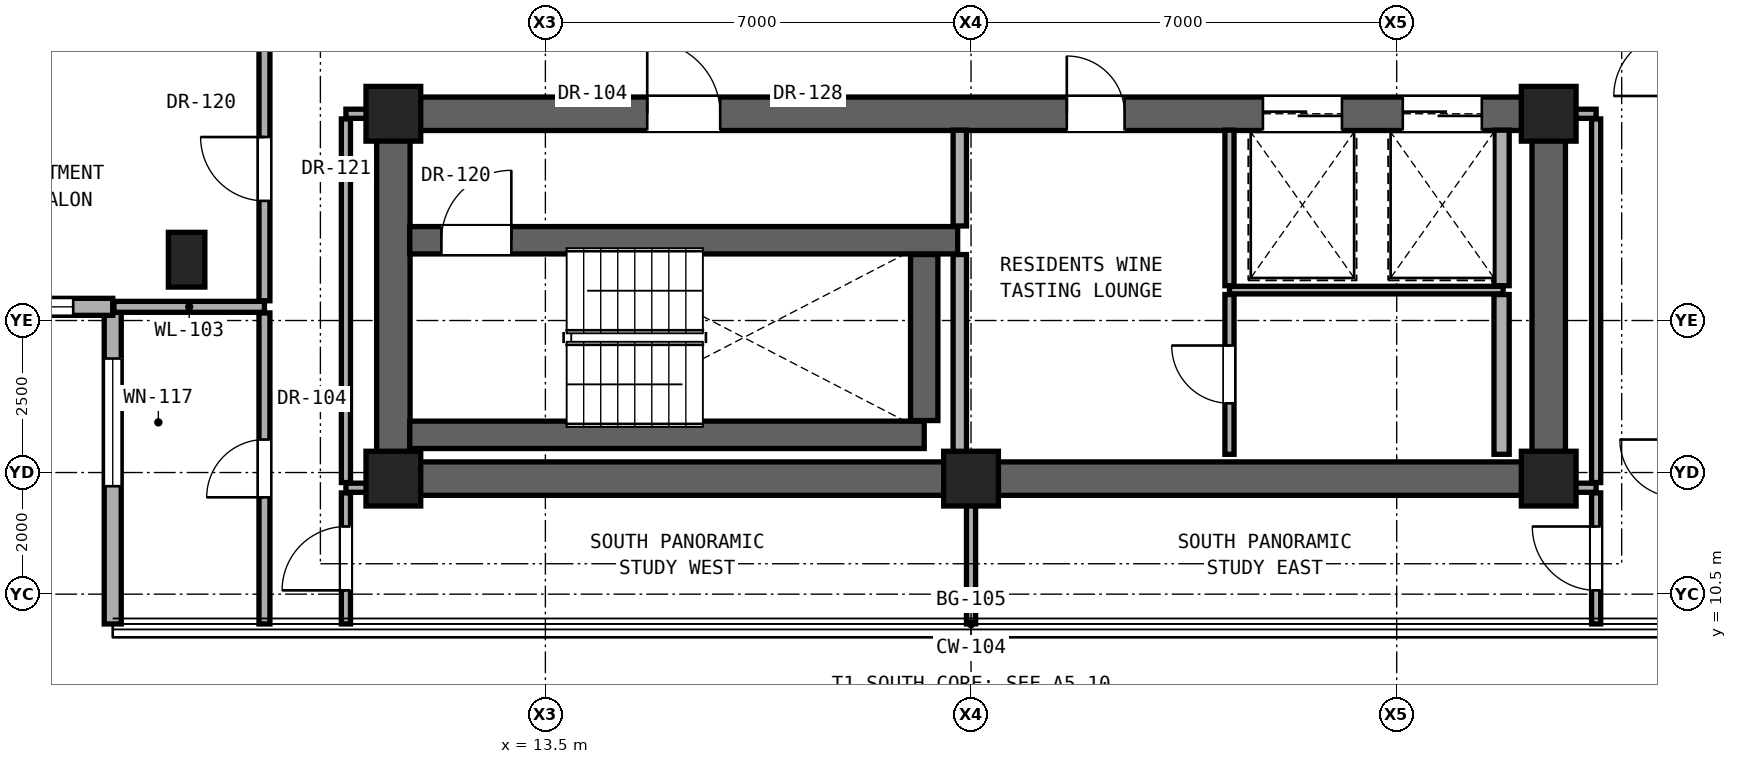
"""IFC4 building model, lengths in metres.
Left out: names, types, materials, properties, quantities, classifications, styles, units other than length and angle.
Written with IfcOpenShell. Run it as: python <this file> out.ifc"""

import sys

from ifc_helpers import new_model, si_unit, direction, frame, frame_2d, origin, origin_2d, place, context, subcontext, project, spatial, rectangle, extrude, element, fill, save


model = new_model("IFC4")
c1 = context("Model", 3, precision=1e-05, world=origin(), true_north=direction((0.0, 1.0)))
c2 = subcontext(c1, "Body", "Model", "MODEL_VIEW")
j1 = project(units=[si_unit("LENGTHUNIT", "METRE"), si_unit("PLANEANGLEUNIT", "RADIAN")], contexts=[c1])
p1 = place(None, origin())
s1 = spatial("IfcSite", under=j1, at=p1, CompositionType="ELEMENT")
p2 = place(p1, origin())
s2 = spatial("IfcBuilding", under=s1, at=p2, CompositionType="ELEMENT")
p3 = place(p2, frame((0.0, 0.0, 183.65)))
s3 = spatial("IfcBuildingStorey", under=s2, at=p3, CompositionType="ELEMENT", Elevation=183.65)
for number, where, z_axis, x_axis in (
    (1, (11.0, 12.4, 0.0), (0.0, 0.0, 1.0), (1.0, 0.0, 0.0)),
    (2, (20.5, 12.4, 0.0), (0.0, 0.0, 1.0), (1.0, 0.0, 0.0)),
    (3, (30.0, 12.4, 0.0), (0.0, 0.0, 1.0), (1.0, 0.0, 0.0)),
    (4, (11.0, 18.4, 0.0), (0.0, 0.0, 1.0), (1.0, 0.0, 0.0)),
    (5, (30.0, 18.4, 0.0), (0.0, 0.0, 1.0), (1.0, 0.0, 0.0)),
):
    element("IfcColumn", number, at=place(p3, frame(where, z_axis=z_axis, x_axis=x_axis)), inside=s3, PredefinedType="COLUMN", context=c2, shape_type="SweptSolid", body=[
        extrude(rectangle(XDim=0.9, YDim=0.9, at=origin_2d()), origin(), (0.0, 0.0, 1.0), 3.25),
    ])
p4 = place(p3, frame((7.6, 16.0, 0.0), z_axis=(0.0, 0.0, 1.0), x_axis=(1.0, 0.0, 0.0)))
e6 = element("IfcColumn", 6, at=p4, inside=s3, PredefinedType="PILASTER", context=c2, shape_type="SweptSolid", body=[
    extrude(rectangle(XDim=0.6, YDim=0.9, at=origin_2d()), origin(), (0.0, 0.0, 1.0), 3.25),
])
p5 = place(p3, frame((11.0, 12.4, 0.0), z_axis=(0.0, 0.0, 1.0), x_axis=(1.0, 0.0, 0.0)))
e7 = element("IfcWall", 7, at=p5, inside=s3, PredefinedType="SHEAR", context=c2, shape_type="SweptSolid", body=[
    extrude(rectangle(XDim=19.0, YDim=0.55, at=frame_2d((9.5, 0.0))), origin(), (0.0, 0.0, 1.0), 3.05),
])
for number, where, z_axis, x_axis in (
    (8, (11.0, 12.4, 0.0), (0.0, 0.0, 1.0), (0.0, 1.0, 0.0)),
    (9, (30.0, 12.4, 0.0), (0.0, 0.0, 1.0), (0.0, 1.0, 0.0)),
):
    element("IfcWall", number, at=place(p3, frame(where, z_axis=z_axis, x_axis=x_axis)), inside=s3, PredefinedType="SHEAR", context=c2, shape_type="SweptSolid", body=[
        extrude(rectangle(XDim=6.0, YDim=0.55, at=frame_2d((3.0, 0.0))), origin(), (0.0, 0.0, 1.0), 3.05),
    ])
p6 = place(p3, frame((11.0, 18.4, 0.0), z_axis=(0.0, 0.0, 1.0), x_axis=(1.0, 0.0, 0.0)))
e10 = element("IfcWall", 10, at=p6, inside=s3, PredefinedType="SHEAR", context=c2, shape_type="SweptSolid", body=[
    extrude(rectangle(XDim=19.0, YDim=0.55, at=frame_2d((9.5, 0.0))), origin(), (0.0, 0.0, 1.0), 3.05),
])
p7 = place(p6, frame((4.175, 0.0, 0.0)))
e11 = element("IfcOpeningElement", 11, at=p7, cuts=e10, PredefinedType="OPENING", context=c2, shape_type="SweptSolid", body=[
    extrude(rectangle(XDim=1.2, YDim=2.25, at=frame_2d((0.6, 1.125))), frame((0.0, 0.285, 0.0), z_axis=(0.0, -1.0, 0.0), x_axis=(1.0, 0.0, 0.0)), (0.0, 0.0, 1.0), 0.57),
])
p8 = place(p6, frame((11.075, 0.0, 0.0)))
e12 = element("IfcOpeningElement", 12, at=p8, cuts=e10, PredefinedType="OPENING", context=c2, shape_type="SweptSolid", body=[
    extrude(rectangle(XDim=0.95, YDim=2.15, at=frame_2d((0.475, 1.075))), frame((0.0, 0.285, 0.0), z_axis=(0.0, -1.0, 0.0), x_axis=(1.0, 0.0, 0.0)), (0.0, 0.0, 1.0), 0.57),
])
p9 = place(p6, frame((14.3, 0.0, 0.0)))
e13 = element("IfcOpeningElement", 13, at=p9, cuts=e10, PredefinedType="OPENING", context=c2, shape_type="SweptSolid", body=[
    extrude(rectangle(XDim=1.3, YDim=2.3, at=frame_2d((0.65, 1.15))), frame((0.0, 0.285, 0.0), z_axis=(0.0, -1.0, 0.0), x_axis=(1.0, 0.0, 0.0)), (0.0, 0.0, 1.0), 0.57),
])
p10 = place(p6, frame((16.6, 0.0, 0.0)))
e14 = element("IfcOpeningElement", 14, at=p10, cuts=e10, PredefinedType="OPENING", context=c2, shape_type="SweptSolid", body=[
    extrude(rectangle(XDim=1.3, YDim=2.3, at=frame_2d((0.65, 1.15))), frame((0.0, 0.285, 0.0), z_axis=(0.0, -1.0, 0.0), x_axis=(1.0, 0.0, 0.0)), (0.0, 0.0, 1.0), 0.57),
])
p11 = place(p3, frame((6.385, 15.225, 0.0), z_axis=(0.0, 0.0, 1.0), x_axis=(0.0, -1.0, 0.0)))
e15 = element("IfcWall", 15, at=p11, inside=s3, PredefinedType="SOLIDWALL", context=c2, shape_type="SweptSolid", body=[
    extrude(rectangle(XDim=5.215, YDim=0.28, at=frame_2d((2.607, 0.0))), origin(), (0.0, 0.0, 1.0), 3.03),
])
p12 = place(p11, frame((0.85, 0.0, 0.68)))
e16 = element("IfcOpeningElement", 16, at=p12, cuts=e15, PredefinedType="OPENING", context=c2, shape_type="SweptSolid", body=[
    extrude(rectangle(XDim=2.1, YDim=2.2, at=frame_2d((1.05, 1.1))), frame((0.0, 0.15, 0.0), z_axis=(0.0, -1.0, 0.0), x_axis=(1.0, 0.0, 0.0)), (0.0, 0.0, 1.0), 0.3),
])
p13 = place(p3, frame((1.17, 15.225, 0.0), z_axis=(0.0, 0.0, 1.0), x_axis=(1.0, 0.0, 0.0)))
e17 = element("IfcWall", 17, at=p13, inside=s3, PredefinedType="SOLIDWALL", context=c2, shape_type="SweptSolid", body=[
    extrude(rectangle(XDim=5.215, YDim=0.28, at=frame_2d((2.607, 0.0))), origin(), (0.0, 0.0, 1.0), 3.03),
])
p14 = place(p13, frame((3.465, 0.0, 0.85)))
e18 = element("IfcOpeningElement", 18, at=p14, cuts=e17, PredefinedType="OPENING", context=c2, shape_type="SweptSolid", body=[
    extrude(rectangle(XDim=1.1, YDim=2.0, at=frame_2d((0.55, 1.0))), frame((0.0, 0.15, 0.0), z_axis=(0.0, -1.0, 0.0), x_axis=(1.0, 0.0, 0.0)), (0.0, 0.0, 1.0), 0.3),
])
for number, where, z_axis, x_axis in (
    (19, (10.22, 12.25, 0.0), (0.0, 0.0, 1.0), (1.0, 0.0, 0.0)),
    (20, (30.27, 12.25, 0.0), (0.0, 0.0, 1.0), (1.0, 0.0, 0.0)),
):
    element("IfcWall", number, at=place(p3, frame(where, z_axis=z_axis, x_axis=x_axis)), inside=s3, PredefinedType="PARTITIONING", context=c2, shape_type="SweptSolid", body=[
        extrude(rectangle(XDim=0.51, YDim=0.15, at=frame_2d((0.255, 0.0))), origin(), (0.0, 0.0, 1.0), 3.05),
    ])
p15 = place(p3, frame((11.27, 13.12, 0.0), z_axis=(0.0, 0.0, 1.0), x_axis=(1.0, 0.0, 0.0)))
e21 = element("IfcWall", 21, at=p15, inside=s3, PredefinedType="SHEAR", context=c2, shape_type="SweptSolid", body=[
    extrude(rectangle(XDim=8.46, YDim=0.45, at=frame_2d((4.23, 0.0))), origin(), (0.0, 0.0, 1.0), 3.05),
])
p16 = place(p3, frame((6.405, 15.225, 0.0), z_axis=(0.0, 0.0, 1.0), x_axis=(1.0, 0.0, 0.0)))
e22 = element("IfcWall", 22, at=p16, inside=s3, PredefinedType="PARTITIONING", context=c2, shape_type="SweptSolid", body=[
    extrude(rectangle(XDim=2.475, YDim=0.18, at=frame_2d((1.237, 0.0))), origin(), (0.0, 0.0, 1.0), 3.05),
])
p17 = place(p3, frame((24.75, 15.5, 0.0), z_axis=(0.0, 0.0, 1.0), x_axis=(1.0, 0.0, 0.0)))
e23 = element("IfcWall", 23, at=p17, inside=s3, PredefinedType="PARTITIONING", context=c2, shape_type="SweptSolid", body=[
    extrude(rectangle(XDim=4.5, YDim=0.125, at=frame_2d((2.25, 0.0))), origin(), (0.0, 0.0, 1.0), 3.05),
])
p18 = place(p3, frame((11.27, 16.32, 0.0), z_axis=(0.0, 0.0, 1.0), x_axis=(1.0, 0.0, 0.0)))
e24 = element("IfcWall", 24, at=p18, inside=s3, PredefinedType="SHEAR", context=c2, shape_type="SweptSolid", body=[
    extrude(rectangle(XDim=9.01, YDim=0.45, at=frame_2d((4.505, 0.0))), origin(), (0.0, 0.0, 1.0), 3.05),
])
p19 = place(p18, frame((0.52, 0.0, 0.0)))
e25 = element("IfcOpeningElement", 25, at=p19, cuts=e24, PredefinedType="OPENING", context=c2, shape_type="SweptSolid", body=[
    extrude(rectangle(XDim=1.15, YDim=2.2, at=frame_2d((0.575, 1.1))), frame((0.0, 0.235, 0.0), z_axis=(0.0, -1.0, 0.0), x_axis=(1.0, 0.0, 0.0)), (0.0, 0.0, 1.0), 0.47),
])
for number, where, z_axis, x_axis in (
    (26, (10.22, 18.4, 0.0), (0.0, 0.0, 1.0), (1.0, 0.0, 0.0)),
    (27, (30.27, 18.4, 0.0), (0.0, 0.0, 1.0), (1.0, 0.0, 0.0)),
):
    element("IfcWall", number, at=place(p3, frame(where, z_axis=z_axis, x_axis=x_axis)), inside=s3, PredefinedType="PARTITIONING", context=c2, shape_type="SweptSolid", body=[
        extrude(rectangle(XDim=0.51, YDim=0.15, at=frame_2d((0.255, 0.0))), origin(), (0.0, 0.0, 1.0), 2.442),
    ])
p20 = place(p3, frame((8.88, 10.01, 0.0), z_axis=(0.0, 0.0, 1.0), x_axis=(0.0, 1.0, 0.0)))
e28 = element("IfcWall", 28, at=p20, inside=s3, PredefinedType="PARTITIONING", context=c2, shape_type="SweptSolid", body=[
    extrude(rectangle(XDim=5.115, YDim=0.18, at=frame_2d((2.558, 0.0))), origin(), (0.0, 0.0, 1.0), 3.05),
])
p21 = place(p20, frame((2.083, 0.0, 0.0)))
e29 = element("IfcOpeningElement", 29, at=p21, cuts=e28, PredefinedType="OPENING", context=c2, shape_type="SweptSolid", body=[
    extrude(rectangle(XDim=0.95, YDim=2.15, at=frame_2d((0.475, 1.075))), frame((0.0, 0.1, 0.0), z_axis=(0.0, -1.0, 0.0), x_axis=(1.0, 0.0, 0.0)), (0.0, 0.0, 1.0), 0.2),
])
p22 = place(p3, frame((8.88, 15.325, 0.0), z_axis=(0.0, 0.0, 1.0), x_axis=(0.0, 1.0, 0.0)))
e30 = element("IfcWall", 30, at=p22, inside=s3, PredefinedType="PARTITIONING", context=c2, shape_type="SweptSolid", body=[
    extrude(rectangle(XDim=4.335, YDim=0.18, at=frame_2d((2.167, 0.0))), origin(), (0.0, 0.0, 1.0), 2.442),
])
p23 = place(p22, frame((1.643, 0.0, 0.0)))
e31 = element("IfcOpeningElement", 31, at=p23, cuts=e30, PredefinedType="OPENING", context=c2, shape_type="SweptSolid", body=[
    extrude(rectangle(XDim=1.05, YDim=2.2, at=frame_2d((0.525, 1.1))), frame((0.0, 0.1, 0.0), z_axis=(0.0, -1.0, 0.0), x_axis=(1.0, 0.0, 0.0)), (0.0, 0.0, 1.0), 0.2),
])
p24 = place(p3, frame((10.22, 10.01, 0.0), z_axis=(0.0, 0.0, 1.0), x_axis=(0.0, 1.0, 0.0)))
e32 = element("IfcWall", 32, at=p24, inside=s3, PredefinedType="PARTITIONING", context=c2, shape_type="SweptSolid", body=[
    extrude(rectangle(XDim=2.155, YDim=0.15, at=frame_2d((1.078, 0.0))), origin(), (0.0, 0.0, 1.0), 3.05),
])
p25 = place(p24, frame((0.552, 0.0, 0.0)))
e33 = element("IfcOpeningElement", 33, at=p25, cuts=e32, PredefinedType="OPENING", context=c2, shape_type="SweptSolid", body=[
    extrude(rectangle(XDim=1.05, YDim=2.2, at=frame_2d((0.525, 1.1))), frame((0.0, 0.085, 0.0), z_axis=(0.0, -1.0, 0.0), x_axis=(1.0, 0.0, 0.0)), (0.0, 0.0, 1.0), 0.17),
])
p26 = place(p3, frame((10.22, 12.335, 0.0), z_axis=(0.0, 0.0, 1.0), x_axis=(0.0, 1.0, 0.0)))
e34 = element("IfcWall", 34, at=p26, inside=s3, PredefinedType="PARTITIONING", context=c2, shape_type="SweptSolid", body=[
    extrude(rectangle(XDim=5.98, YDim=0.15, at=frame_2d((2.99, 0.0))), origin(), (0.0, 0.0, 1.0), 2.442),
])
p27 = place(p3, frame((19.73, 13.355, 0.0), z_axis=(0.0, 0.0, 1.0), x_axis=(0.0, 1.0, 0.0)))
e35 = element("IfcWall", 35, at=p27, inside=s3, PredefinedType="SHEAR", context=c2, shape_type="SweptSolid", body=[
    extrude(rectangle(XDim=2.73, YDim=0.45, at=frame_2d((1.365, 0.0))), origin(), (0.0, 0.0, 1.0), 3.05),
])
p28 = place(p3, frame((20.315, 12.8, 0.0), z_axis=(0.0, 0.0, 1.0), x_axis=(0.0, 1.0, 0.0)))
e36 = element("IfcWall", 36, at=p28, inside=s3, PredefinedType="SOLIDWALL", context=c2, shape_type="SweptSolid", body=[
    extrude(rectangle(XDim=3.285, YDim=0.22, at=frame_2d((1.643, 0.0))), origin(), (0.0, 0.0, 1.0), 3.05),
])
p29 = place(p3, frame((20.315, 16.555, 0.0), z_axis=(0.0, 0.0, 1.0), x_axis=(0.0, 1.0, 0.0)))
e37 = element("IfcWall", 37, at=p29, inside=s3, PredefinedType="SOLIDWALL", context=c2, shape_type="SweptSolid", body=[
    extrude(rectangle(XDim=1.575, YDim=0.22, at=frame_2d((0.788, 0.0))), origin(), (0.0, 0.0, 1.0), 3.05),
])
p30 = place(p3, frame((20.5, 10.01, 0.0), z_axis=(0.0, 0.0, 1.0), x_axis=(0.0, 1.0, 0.0)))
e38 = element("IfcWall", 38, at=p30, inside=s3, PredefinedType="PARTITIONING", context=c2, shape_type="SweptSolid", body=[
    extrude(rectangle(XDim=2.12, YDim=0.15, at=frame_2d((1.06, 0.0))), origin(), (0.0, 0.0, 1.0), 3.05),
])
p31 = place(p3, frame((24.75, 12.8, 0.0), z_axis=(0.0, 0.0, 1.0), x_axis=(0.0, 1.0, 0.0)))
e39 = element("IfcWall", 39, at=p31, inside=s3, PredefinedType="PARTITIONING", context=c2, shape_type="SweptSolid", body=[
    extrude(rectangle(XDim=2.627, YDim=0.15, at=frame_2d((1.314, 0.0))), origin(), (0.0, 0.0, 1.0), 3.05),
])
p32 = place(p31, frame((0.839, 0.0, 0.0)))
e40 = element("IfcOpeningElement", 40, at=p32, cuts=e39, PredefinedType="OPENING", context=c2, shape_type="SweptSolid", body=[
    extrude(rectangle(XDim=0.95, YDim=2.15, at=frame_2d((0.475, 1.075))), frame((0.0, 0.085, 0.0), z_axis=(0.0, -1.0, 0.0), x_axis=(1.0, 0.0, 0.0)), (0.0, 0.0, 1.0), 0.17),
])
p33 = place(p3, frame((24.75, 15.573, 0.0), z_axis=(0.0, 0.0, 1.0), x_axis=(0.0, 1.0, 0.0)))
e41 = element("IfcWall", 41, at=p33, inside=s3, PredefinedType="PARTITIONING", context=c2, shape_type="SweptSolid", body=[
    extrude(rectangle(XDim=2.557, YDim=0.15, at=frame_2d((1.279, 0.0))), origin(), (0.0, 0.0, 1.0), 3.05),
])
p34 = place(p3, frame((29.225, 12.8, 0.0), z_axis=(0.0, 0.0, 1.0), x_axis=(0.0, 1.0, 0.0)))
e42 = element("IfcWall", 42, at=p34, inside=s3, PredefinedType="SOLIDWALL", context=c2, shape_type="SweptSolid", body=[
    extrude(rectangle(XDim=2.627, YDim=0.25, at=frame_2d((1.314, 0.0))), origin(), (0.0, 0.0, 1.0), 3.05),
])
p35 = place(p3, frame((29.225, 15.573, 0.0), z_axis=(0.0, 0.0, 1.0), x_axis=(0.0, 1.0, 0.0)))
e43 = element("IfcWall", 43, at=p35, inside=s3, PredefinedType="SOLIDWALL", context=c2, shape_type="SweptSolid", body=[
    extrude(rectangle(XDim=2.557, YDim=0.25, at=frame_2d((1.279, 0.0))), origin(), (0.0, 0.0, 1.0), 3.05),
])
p36 = place(p3, frame((30.78, 10.01, 0.0), z_axis=(0.0, 0.0, 1.0), x_axis=(0.0, 1.0, 0.0)))
e44 = element("IfcWall", 44, at=p36, inside=s3, PredefinedType="PARTITIONING", context=c2, shape_type="SweptSolid", body=[
    extrude(rectangle(XDim=2.155, YDim=0.15, at=frame_2d((1.078, 0.0))), origin(), (0.0, 0.0, 1.0), 3.05),
])
p37 = place(p36, frame((0.552, 0.0, 0.0)))
e45 = element("IfcOpeningElement", 45, at=p37, cuts=e44, PredefinedType="OPENING", context=c2, shape_type="SweptSolid", body=[
    extrude(rectangle(XDim=1.05, YDim=2.2, at=frame_2d((0.525, 1.1))), frame((0.0, 0.085, 0.0), z_axis=(0.0, -1.0, 0.0), x_axis=(1.0, 0.0, 0.0)), (0.0, 0.0, 1.0), 0.17),
])
p38 = place(p3, frame((30.78, 12.335, 0.0), z_axis=(0.0, 0.0, 1.0), x_axis=(0.0, 1.0, 0.0)))
e46 = element("IfcWall", 46, at=p38, inside=s3, PredefinedType="PARTITIONING", context=c2, shape_type="SweptSolid", body=[
    extrude(rectangle(XDim=5.98, YDim=0.15, at=frame_2d((2.99, 0.0))), origin(), (0.0, 0.0, 1.0), 2.442),
])
p39 = place(p12, origin())
e47 = element("IfcWindow", 47, at=p39, inside=s3, PartitioningType="SINGLE_PANEL", PredefinedType="WINDOW", context=c2, shape_type="SweptSolid", body=[
    extrude(rectangle(XDim=2.1, YDim=2.2, at=frame_2d((1.05, 1.1))), frame((0.0, 0.03, 0.0), z_axis=(0.0, -1.0, 0.0), x_axis=(1.0, 0.0, 0.0)), (0.0, 0.0, 1.0), 0.06),
])
fill(e16, e47)
p40 = place(p14, origin())
e48 = element("IfcWindow", 48, at=p40, inside=s3, PartitioningType="SINGLE_PANEL", PredefinedType="WINDOW", context=c2, shape_type="SweptSolid", body=[
    extrude(rectangle(XDim=1.1, YDim=2.0, at=frame_2d((0.55, 1.0))), frame((0.0, 0.03, 0.0), z_axis=(0.0, -1.0, 0.0), x_axis=(1.0, 0.0, 0.0)), (0.0, 0.0, 1.0), 0.06),
])
fill(e18, e48)
p41 = place(p7, origin())
e49 = element("IfcDoor", 49, at=p41, inside=s3, OperationType="SINGLE_SWING_LEFT", PredefinedType="DOOR", context=c2, shape_type="SweptSolid", body=[
    extrude(rectangle(XDim=1.2, YDim=2.25, at=frame_2d((0.6, 1.125))), frame((0.0, 0.025, 0.0), z_axis=(0.0, -1.0, 0.0), x_axis=(1.0, 0.0, 0.0)), (0.0, 0.0, 1.0), 0.05),
])
fill(e11, e49)
p42 = place(p19, origin())
e50 = element("IfcDoor", 50, at=p42, inside=s3, OperationType="SINGLE_SWING_RIGHT", PredefinedType="DOOR", context=c2, shape_type="SweptSolid", body=[
    extrude(rectangle(XDim=1.15, YDim=2.2, at=frame_2d((0.575, 1.1))), frame((0.0, 0.025, 0.0), z_axis=(0.0, -1.0, 0.0), x_axis=(1.0, 0.0, 0.0)), (0.0, 0.0, 1.0), 0.05),
])
fill(e25, e50)
p43 = place(p8, origin())
e51 = element("IfcDoor", 51, at=p43, inside=s3, OperationType="SINGLE_SWING_LEFT", PredefinedType="DOOR", context=c2, shape_type="SweptSolid", body=[
    extrude(rectangle(XDim=0.95, YDim=2.15, at=frame_2d((0.475, 1.075))), frame((0.0, 0.025, 0.0), z_axis=(0.0, -1.0, 0.0), x_axis=(1.0, 0.0, 0.0)), (0.0, 0.0, 1.0), 0.05),
])
fill(e12, e51)
p44 = place(p32, origin())
e52 = element("IfcDoor", 52, at=p44, inside=s3, OperationType="SINGLE_SWING_RIGHT", PredefinedType="DOOR", context=c2, shape_type="SweptSolid", body=[
    extrude(rectangle(XDim=0.95, YDim=2.15, at=frame_2d((0.475, 1.075))), frame((0.0, 0.025, 0.0), z_axis=(0.0, -1.0, 0.0), x_axis=(1.0, 0.0, 0.0)), (0.0, 0.0, 1.0), 0.05),
])
fill(e40, e52)
p45 = place(p23, origin())
e53 = element("IfcDoor", 53, at=p45, inside=s3, OperationType="SINGLE_SWING_RIGHT", PredefinedType="DOOR", context=c2, shape_type="SweptSolid", body=[
    extrude(rectangle(XDim=1.05, YDim=2.2, at=frame_2d((0.525, 1.1))), frame((0.0, 0.025, 0.0), z_axis=(0.0, -1.0, 0.0), x_axis=(1.0, 0.0, 0.0)), (0.0, 0.0, 1.0), 0.05),
])
fill(e31, e53)
p46 = place(p25, origin())
e54 = element("IfcDoor", 54, at=p46, inside=s3, OperationType="SINGLE_SWING_LEFT", PredefinedType="DOOR", context=c2, shape_type="SweptSolid", body=[
    extrude(rectangle(XDim=1.05, YDim=2.2, at=frame_2d((0.525, 1.1))), frame((0.0, 0.025, 0.0), z_axis=(0.0, -1.0, 0.0), x_axis=(1.0, 0.0, 0.0)), (0.0, 0.0, 1.0), 0.05),
])
fill(e33, e54)
p47 = place(p37, origin())
e55 = element("IfcDoor", 55, at=p47, inside=s3, OperationType="SINGLE_SWING_RIGHT", PredefinedType="DOOR", context=c2, shape_type="SweptSolid", body=[
    extrude(rectangle(XDim=1.05, YDim=2.2, at=frame_2d((0.525, 1.1))), frame((0.0, 0.025, 0.0), z_axis=(0.0, -1.0, 0.0), x_axis=(1.0, 0.0, 0.0)), (0.0, 0.0, 1.0), 0.05),
])
fill(e45, e55)
p48 = place(p21, origin())
e56 = element("IfcDoor", 56, at=p48, inside=s3, OperationType="SINGLE_SWING_LEFT", PredefinedType="DOOR", context=c2, shape_type="SweptSolid", body=[
    extrude(rectangle(XDim=0.95, YDim=2.15, at=frame_2d((0.475, 1.075))), frame((0.0, 0.025, 0.0), z_axis=(0.0, -1.0, 0.0), x_axis=(1.0, 0.0, 0.0)), (0.0, 0.0, 1.0), 0.05),
])
fill(e29, e56)
p49 = place(p9, origin())
e57 = element("IfcDoor", 57, at=p49, inside=s3, OperationType="DOUBLE_DOOR_SLIDING", PredefinedType="DOOR", context=c2, shape_type="SweptSolid", body=[
    extrude(rectangle(XDim=1.3, YDim=2.3, at=frame_2d((0.65, 1.15))), frame((0.0, 0.025, 0.0), z_axis=(0.0, -1.0, 0.0), x_axis=(1.0, 0.0, 0.0)), (0.0, 0.0, 1.0), 0.05),
])
fill(e13, e57)
p50 = place(p10, origin())
e58 = element("IfcDoor", 58, at=p50, inside=s3, OperationType="DOUBLE_DOOR_SLIDING", PredefinedType="DOOR", context=c2, shape_type="SweptSolid", body=[
    extrude(rectangle(XDim=1.3, YDim=2.3, at=frame_2d((0.65, 1.15))), frame((0.0, 0.025, 0.0), z_axis=(0.0, -1.0, 0.0), x_axis=(1.0, 0.0, 0.0)), (0.0, 0.0, 1.0), 0.05),
])
fill(e14, e58)
save(model, sys.argv[1])
